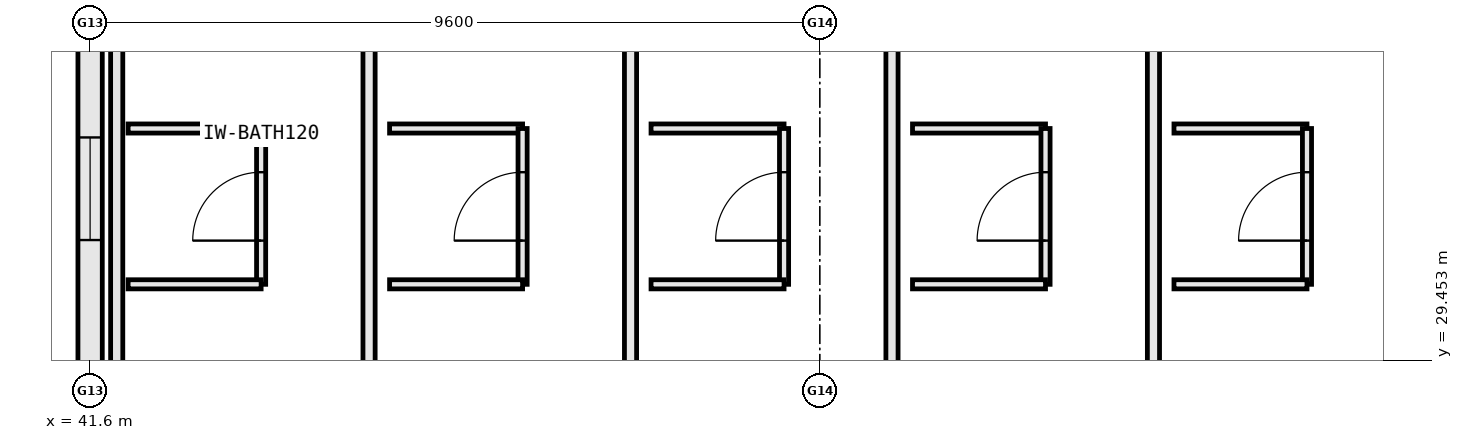
"""IFC4 building model, lengths in metres.
Left out: names, types, materials, properties, quantities, classifications, styles, units other than length and angle.
Written with IfcOpenShell. Run it as: python <this file> out.ifc"""

import sys

from ifc_helpers import new_model, si_unit, direction, frame, frame_2d, origin, place, context, subcontext, project, spatial, rectangle, extrude, element, fill, save


model = new_model("IFC4")
c1 = context("Model", 3, precision=1e-05, world=origin(), true_north=direction((0.0, 1.0)))
c2 = subcontext(c1, "Body", "Model", "MODEL_VIEW")
j1 = project(units=[si_unit("LENGTHUNIT", "METRE"), si_unit("PLANEANGLEUNIT", "RADIAN")], contexts=[c1])
p1 = place(None, origin())
s1 = spatial("IfcSite", under=j1, at=p1, CompositionType="ELEMENT")
p2 = place(p1, origin())
s2 = spatial("IfcBuilding", under=s1, at=p2, CompositionType="ELEMENT")
p3 = place(p2, frame((0.0, 0.0, 20.0)))
s3 = spatial("IfcBuildingStorey", under=s2, at=p3, CompositionType="ELEMENT", Elevation=20.0)
p4 = place(p3, frame((41.6, 36.192, 0.0), z_axis=(0.0, 0.0, 1.0), x_axis=(0.0, -1.0, 0.0)))
e1 = element("IfcWall", 1, at=p4, inside=s3, PredefinedType="STANDARD", context=c2, shape_type="SweptSolid", body=[
    extrude(rectangle(XDim=8.969, YDim=0.32, at=frame_2d((4.484, 0.0))), origin(), (0.0, 0.0, 1.0), 2.925),
])
p5 = place(p4, frame((3.81, 0.0, 0.85)))
e2 = element("IfcOpeningElement", 2, at=p5, cuts=e1, PredefinedType="OPENING", context=c2, shape_type="SweptSolid", body=[
    extrude(rectangle(XDim=1.35, YDim=1.65, at=frame_2d((0.675, 0.825))), frame((0.0, 0.172, 0.0), z_axis=(0.0, -1.0, 0.0), x_axis=(1.0, 0.0, 0.0)), (0.0, 0.0, 1.0), 0.344),
])
p6 = place(p3, frame((41.95, 27.16, 0.0), z_axis=(0.0, 0.0, 1.0), x_axis=(0.0, 1.0, 0.0)))
e3 = element("IfcWall", 3, at=p6, inside=s3, PredefinedType="PARTITIONING", context=c2, shape_type="SweptSolid", body=[
    extrude(rectangle(XDim=10.34, YDim=0.16, at=frame_2d((5.17, 0.0))), origin(), (0.0, 0.0, 1.0), 2.905),
])
p7 = place(p3, frame((45.27, 27.16, 0.0), z_axis=(0.0, 0.0, 1.0), x_axis=(0.0, 1.0, 0.0)))
e4 = element("IfcWall", 4, at=p7, inside=s3, PredefinedType="PARTITIONING", context=c2, shape_type="SweptSolid", body=[
    extrude(rectangle(XDim=10.34, YDim=0.16, at=frame_2d((5.17, 0.0))), origin(), (0.0, 0.0, 1.0), 3.55),
])
p8 = place(p3, frame((42.1, 32.5, 0.0), z_axis=(0.0, 0.0, 1.0), x_axis=(1.0, 0.0, 0.0)))
e5 = element("IfcWall", 5, at=p8, inside=s3, PredefinedType="PARTITIONING", context=c2, shape_type="SweptSolid", body=[
    extrude(rectangle(XDim=1.75, YDim=0.12, at=frame_2d((0.875, 0.0))), origin(), (0.0, 0.0, 1.0), 3.55),
])
p9 = place(p3, frame((43.85, 30.45, 0.0), z_axis=(0.0, 0.0, 1.0), x_axis=(0.0, 1.0, 0.0)))
e6 = element("IfcWall", 6, at=p9, inside=s3, PredefinedType="PARTITIONING", context=c2, shape_type="SweptSolid", body=[
    extrude(rectangle(XDim=2.05, YDim=0.12, at=frame_2d((1.025, 0.0))), origin(), (0.0, 0.0, 1.0), 3.095),
])
p10 = place(p9, frame((0.575, 0.0, 0.0)))
e7 = element("IfcOpeningElement", 7, at=p10, cuts=e6, PredefinedType="OPENING", context=c2, shape_type="SweptSolid", body=[
    extrude(rectangle(XDim=0.9, YDim=2.15, at=frame_2d((0.45, 1.075))), frame((0.0, 0.072, 0.0), z_axis=(0.0, -1.0, 0.0), x_axis=(1.0, 0.0, 0.0)), (0.0, 0.0, 1.0), 0.144),
])
p11 = place(p3, frame((42.1, 30.45, 0.0), z_axis=(0.0, 0.0, 1.0), x_axis=(1.0, 0.0, 0.0)))
e8 = element("IfcWall", 8, at=p11, inside=s3, PredefinedType="PARTITIONING", context=c2, shape_type="SweptSolid", body=[
    extrude(rectangle(XDim=1.75, YDim=0.12, at=frame_2d((0.875, 0.0))), origin(), (0.0, 0.0, 1.0), 3.55),
])
p12 = place(p3, frame((48.71, 27.16, 0.0), z_axis=(0.0, 0.0, 1.0), x_axis=(0.0, 1.0, 0.0)))
e9 = element("IfcWall", 9, at=p12, inside=s3, PredefinedType="PARTITIONING", context=c2, shape_type="SweptSolid", body=[
    extrude(rectangle(XDim=10.34, YDim=0.16, at=frame_2d((5.17, 0.0))), origin(), (0.0, 0.0, 1.0), 3.05),
])
p13 = place(p3, frame((45.54, 32.5, 0.0), z_axis=(0.0, 0.0, 1.0), x_axis=(1.0, 0.0, 0.0)))
e10 = element("IfcWall", 10, at=p13, inside=s3, PredefinedType="PARTITIONING", context=c2, shape_type="SweptSolid", body=[
    extrude(rectangle(XDim=1.75, YDim=0.12, at=frame_2d((0.875, 0.0))), origin(), (0.0, 0.0, 1.0), 3.55),
])
p14 = place(p3, frame((47.29, 30.45, 0.0), z_axis=(0.0, 0.0, 1.0), x_axis=(0.0, 1.0, 0.0)))
e11 = element("IfcWall", 11, at=p14, inside=s3, PredefinedType="PARTITIONING", context=c2, shape_type="SweptSolid", body=[
    extrude(rectangle(XDim=2.05, YDim=0.12, at=frame_2d((1.025, 0.0))), origin(), (0.0, 0.0, 1.0), 3.55),
])
p15 = place(p14, frame((0.575, 0.0, 0.0)))
e12 = element("IfcOpeningElement", 12, at=p15, cuts=e11, PredefinedType="OPENING", context=c2, shape_type="SweptSolid", body=[
    extrude(rectangle(XDim=0.9, YDim=2.15, at=frame_2d((0.45, 1.075))), frame((0.0, 0.072, 0.0), z_axis=(0.0, -1.0, 0.0), x_axis=(1.0, 0.0, 0.0)), (0.0, 0.0, 1.0), 0.144),
])
p16 = place(p3, frame((45.54, 30.45, 0.0), z_axis=(0.0, 0.0, 1.0), x_axis=(1.0, 0.0, 0.0)))
e13 = element("IfcWall", 13, at=p16, inside=s3, PredefinedType="PARTITIONING", context=c2, shape_type="SweptSolid", body=[
    extrude(rectangle(XDim=1.75, YDim=0.12, at=frame_2d((0.875, 0.0))), origin(), (0.0, 0.0, 1.0), 3.55),
])
p17 = place(p3, frame((52.15, 27.16, 0.0), z_axis=(0.0, 0.0, 1.0), x_axis=(0.0, 1.0, 0.0)))
e14 = element("IfcWall", 14, at=p17, inside=s3, PredefinedType="PARTITIONING", context=c2, shape_type="SweptSolid", body=[
    extrude(rectangle(XDim=10.34, YDim=0.16, at=frame_2d((5.17, 0.0))), origin(), (0.0, 0.0, 1.0), 3.55),
])
p18 = place(p3, frame((48.98, 32.5, 0.0), z_axis=(0.0, 0.0, 1.0), x_axis=(1.0, 0.0, 0.0)))
e15 = element("IfcWall", 15, at=p18, inside=s3, PredefinedType="PARTITIONING", context=c2, shape_type="SweptSolid", body=[
    extrude(rectangle(XDim=1.75, YDim=0.12, at=frame_2d((0.875, 0.0))), origin(), (0.0, 0.0, 1.0), 3.55),
])
p19 = place(p3, frame((50.73, 30.45, 0.0), z_axis=(0.0, 0.0, 1.0), x_axis=(0.0, 1.0, 0.0)))
e16 = element("IfcWall", 16, at=p19, inside=s3, PredefinedType="PARTITIONING", context=c2, shape_type="SweptSolid", body=[
    extrude(rectangle(XDim=2.05, YDim=0.12, at=frame_2d((1.025, 0.0))), origin(), (0.0, 0.0, 1.0), 3.55),
])
p20 = place(p19, frame((0.575, 0.0, 0.0)))
e17 = element("IfcOpeningElement", 17, at=p20, cuts=e16, PredefinedType="OPENING", context=c2, shape_type="SweptSolid", body=[
    extrude(rectangle(XDim=0.9, YDim=2.15, at=frame_2d((0.45, 1.075))), frame((0.0, 0.072, 0.0), z_axis=(0.0, -1.0, 0.0), x_axis=(1.0, 0.0, 0.0)), (0.0, 0.0, 1.0), 0.144),
])
p21 = place(p3, frame((48.98, 30.45, 0.0), z_axis=(0.0, 0.0, 1.0), x_axis=(1.0, 0.0, 0.0)))
e18 = element("IfcWall", 18, at=p21, inside=s3, PredefinedType="PARTITIONING", context=c2, shape_type="SweptSolid", body=[
    extrude(rectangle(XDim=1.75, YDim=0.12, at=frame_2d((0.875, 0.0))), origin(), (0.0, 0.0, 1.0), 3.55),
])
p22 = place(p3, frame((55.59, 27.16, 0.0), z_axis=(0.0, 0.0, 1.0), x_axis=(0.0, 1.0, 0.0)))
e19 = element("IfcWall", 19, at=p22, inside=s3, PredefinedType="PARTITIONING", context=c2, shape_type="SweptSolid", body=[
    extrude(rectangle(XDim=10.34, YDim=0.16, at=frame_2d((5.17, 0.0))), origin(), (0.0, 0.0, 1.0), 3.55),
])
p23 = place(p3, frame((52.42, 32.5, 0.0), z_axis=(0.0, 0.0, 1.0), x_axis=(1.0, 0.0, 0.0)))
e20 = element("IfcWall", 20, at=p23, inside=s3, PredefinedType="PARTITIONING", context=c2, shape_type="SweptSolid", body=[
    extrude(rectangle(XDim=1.75, YDim=0.12, at=frame_2d((0.875, 0.0))), origin(), (0.0, 0.0, 1.0), 3.55),
])
p24 = place(p3, frame((54.17, 30.45, 0.0), z_axis=(0.0, 0.0, 1.0), x_axis=(0.0, 1.0, 0.0)))
e21 = element("IfcWall", 21, at=p24, inside=s3, PredefinedType="PARTITIONING", context=c2, shape_type="SweptSolid", body=[
    extrude(rectangle(XDim=2.05, YDim=0.12, at=frame_2d((1.025, 0.0))), origin(), (0.0, 0.0, 1.0), 3.095),
])
p25 = place(p24, frame((0.575, 0.0, 0.0)))
e22 = element("IfcOpeningElement", 22, at=p25, cuts=e21, PredefinedType="OPENING", context=c2, shape_type="SweptSolid", body=[
    extrude(rectangle(XDim=0.9, YDim=2.15, at=frame_2d((0.45, 1.075))), frame((0.0, 0.072, 0.0), z_axis=(0.0, -1.0, 0.0), x_axis=(1.0, 0.0, 0.0)), (0.0, 0.0, 1.0), 0.144),
])
for number, where, z_axis, x_axis in (
    (23, (52.42, 30.45, 0.0), (0.0, 0.0, 1.0), (1.0, 0.0, 0.0)),
    (24, (55.86, 32.5, 0.0), (0.0, 0.0, 1.0), (1.0, 0.0, 0.0)),
):
    element("IfcWall", number, at=place(p3, frame(where, z_axis=z_axis, x_axis=x_axis)), inside=s3, PredefinedType="PARTITIONING", context=c2, shape_type="SweptSolid", body=[
        extrude(rectangle(XDim=1.75, YDim=0.12, at=frame_2d((0.875, 0.0))), origin(), (0.0, 0.0, 1.0), 3.55),
    ])
p26 = place(p3, frame((57.61, 30.45, 0.0), z_axis=(0.0, 0.0, 1.0), x_axis=(0.0, 1.0, 0.0)))
e25 = element("IfcWall", 25, at=p26, inside=s3, PredefinedType="PARTITIONING", context=c2, shape_type="SweptSolid", body=[
    extrude(rectangle(XDim=2.05, YDim=0.12, at=frame_2d((1.025, 0.0))), origin(), (0.0, 0.0, 1.0), 3.095),
])
p27 = place(p26, frame((0.575, 0.0, 0.0)))
e26 = element("IfcOpeningElement", 26, at=p27, cuts=e25, PredefinedType="OPENING", context=c2, shape_type="SweptSolid", body=[
    extrude(rectangle(XDim=0.9, YDim=2.15, at=frame_2d((0.45, 1.075))), frame((0.0, 0.072, 0.0), z_axis=(0.0, -1.0, 0.0), x_axis=(1.0, 0.0, 0.0)), (0.0, 0.0, 1.0), 0.144),
])
p28 = place(p3, frame((55.86, 30.45, 0.0), z_axis=(0.0, 0.0, 1.0), x_axis=(1.0, 0.0, 0.0)))
e27 = element("IfcWall", 27, at=p28, inside=s3, PredefinedType="PARTITIONING", context=c2, shape_type="SweptSolid", body=[
    extrude(rectangle(XDim=1.75, YDim=0.12, at=frame_2d((0.875, 0.0))), origin(), (0.0, 0.0, 1.0), 3.55),
])
p29 = place(p5, origin())
e28 = element("IfcWindow", 28, at=p29, inside=s3, PartitioningType="SINGLE_PANEL", PredefinedType="WINDOW", context=c2, shape_type="SweptSolid", body=[
    extrude(rectangle(XDim=1.35, YDim=1.65, at=frame_2d((0.675, 0.825))), frame((0.0, 0.03, 0.0), z_axis=(0.0, -1.0, 0.0), x_axis=(1.0, 0.0, 0.0)), (0.0, 0.0, 1.0), 0.06),
])
fill(e2, e28)
p30 = place(p10, origin())
e29 = element("IfcDoor", 29, at=p30, inside=s3, OperationType="SINGLE_SWING_LEFT", PredefinedType="DOOR", context=c2, shape_type="SweptSolid", body=[
    extrude(rectangle(XDim=0.9, YDim=2.15, at=frame_2d((0.45, 1.075))), frame((0.0, 0.025, 0.0), z_axis=(0.0, -1.0, 0.0), x_axis=(1.0, 0.0, 0.0)), (0.0, 0.0, 1.0), 0.05),
])
fill(e7, e29)
p31 = place(p15, origin())
e30 = element("IfcDoor", 30, at=p31, inside=s3, OperationType="SINGLE_SWING_LEFT", PredefinedType="DOOR", context=c2, shape_type="SweptSolid", body=[
    extrude(rectangle(XDim=0.9, YDim=2.15, at=frame_2d((0.45, 1.075))), frame((0.0, 0.025, 0.0), z_axis=(0.0, -1.0, 0.0), x_axis=(1.0, 0.0, 0.0)), (0.0, 0.0, 1.0), 0.05),
])
fill(e12, e30)
p32 = place(p20, origin())
e31 = element("IfcDoor", 31, at=p32, inside=s3, OperationType="SINGLE_SWING_LEFT", PredefinedType="DOOR", context=c2, shape_type="SweptSolid", body=[
    extrude(rectangle(XDim=0.9, YDim=2.15, at=frame_2d((0.45, 1.075))), frame((0.0, 0.025, 0.0), z_axis=(0.0, -1.0, 0.0), x_axis=(1.0, 0.0, 0.0)), (0.0, 0.0, 1.0), 0.05),
])
fill(e17, e31)
p33 = place(p25, origin())
e32 = element("IfcDoor", 32, at=p33, inside=s3, OperationType="SINGLE_SWING_LEFT", PredefinedType="DOOR", context=c2, shape_type="SweptSolid", body=[
    extrude(rectangle(XDim=0.9, YDim=2.15, at=frame_2d((0.45, 1.075))), frame((0.0, 0.025, 0.0), z_axis=(0.0, -1.0, 0.0), x_axis=(1.0, 0.0, 0.0)), (0.0, 0.0, 1.0), 0.05),
])
fill(e22, e32)
p34 = place(p27, origin())
e33 = element("IfcDoor", 33, at=p34, inside=s3, OperationType="SINGLE_SWING_LEFT", PredefinedType="DOOR", context=c2, shape_type="SweptSolid", body=[
    extrude(rectangle(XDim=0.9, YDim=2.15, at=frame_2d((0.45, 1.075))), frame((0.0, 0.025, 0.0), z_axis=(0.0, -1.0, 0.0), x_axis=(1.0, 0.0, 0.0)), (0.0, 0.0, 1.0), 0.05),
])
fill(e26, e33)
save(model, sys.argv[1])
